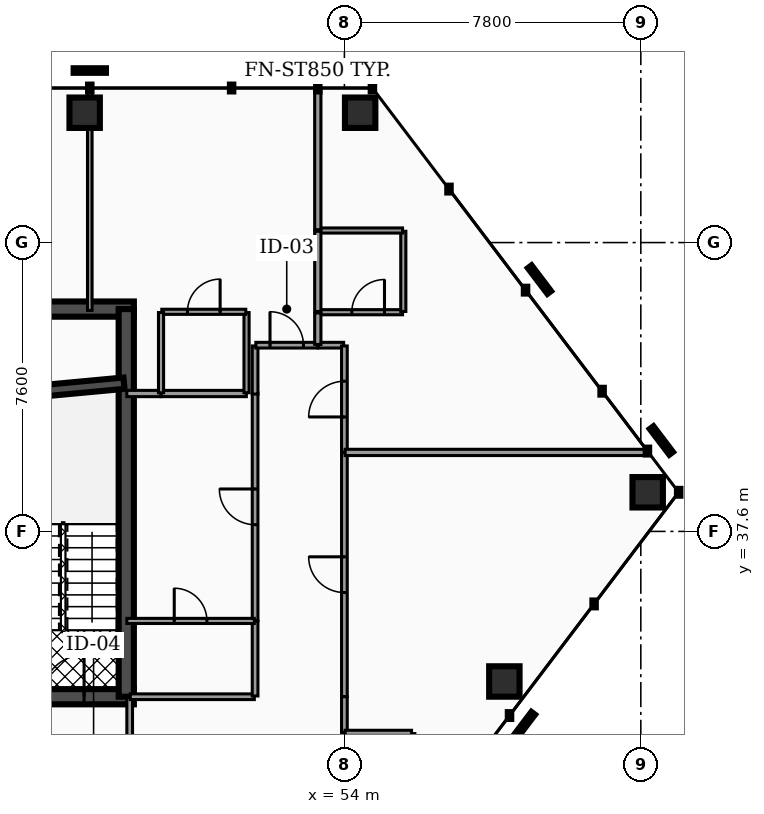
"""IFC4 building model, lengths in metres.
Left out: names, types, materials, properties, quantities, classifications, styles, units other than length and angle.
Written with IfcOpenShell. Run it as: python <this file> out.ifc"""

import sys

from ifc_helpers import new_model, si_unit, direction, frame, frame_2d, origin, origin_2d, place, context, subcontext, project, spatial, rectangle, hollow_rectangle, extrude, element, fill, save


model = new_model("IFC4")
c1 = context("Model", 3, precision=1e-05, world=origin(), true_north=direction((0.0, 1.0)))
c2 = subcontext(c1, "Body", "Model", "MODEL_VIEW")
j1 = project(units=[si_unit("LENGTHUNIT", "METRE"), si_unit("PLANEANGLEUNIT", "RADIAN")], contexts=[c1])
p1 = place(None, origin())
s1 = spatial("IfcSite", under=j1, at=p1, CompositionType="ELEMENT")
p2 = place(p1, origin())
s2 = spatial("IfcBuilding", under=s1, at=p2, CompositionType="ELEMENT")
p3 = place(p2, frame((0.0, 0.0, 123.42)))
s3 = spatial("IfcBuildingStorey", under=s2, at=p3, CompositionType="ELEMENT", Elevation=123.42)
p4 = place(p3, frame((28.4, 43.45, 0.0), z_axis=(0.0, 0.0, 1.0), x_axis=(1.0, 0.0, 0.0)))
e1 = element("IfcWall", 1, at=p4, inside=s3, PredefinedType="SHEAR", context=c2, shape_type="SweptSolid", body=[
    extrude(rectangle(XDim=20.06, YDim=0.4, at=frame_2d((10.03, 0.0))), origin(), (0.0, 0.0, 1.0), 3.5),
])
p5 = place(p3, frame((28.4, 33.25, 0.0), z_axis=(0.0, 0.0, 1.0), x_axis=(1.0, 0.0, 0.0)))
e2 = element("IfcWall", 2, at=p5, inside=s3, PredefinedType="SHEAR", context=c2, shape_type="SweptSolid", body=[
    extrude(rectangle(XDim=20.06, YDim=0.4, at=frame_2d((10.03, 0.0))), origin(), (0.0, 0.0, 1.0), 3.5),
])
p6 = place(p5, frame((4.03, 0.0, 0.0)))
e3 = element("IfcOpeningElement", 3, at=p6, cuts=e2, PredefinedType="OPENING", context=c2, shape_type="SweptSolid", body=[
    extrude(rectangle(XDim=1.1, YDim=2.15, at=frame_2d((0.55, 1.075))), frame((0.0, 0.21, 0.0), z_axis=(0.0, -1.0, 0.0), x_axis=(1.0, 0.0, 0.0)), (0.0, 0.0, 1.0), 0.42),
])
p7 = place(p5, frame((14.87, 0.0, 0.0)))
e4 = element("IfcOpeningElement", 4, at=p7, cuts=e2, PredefinedType="OPENING", context=c2, shape_type="SweptSolid", body=[
    extrude(rectangle(XDim=1.1, YDim=2.15, at=frame_2d((0.55, 1.075))), frame((0.0, 0.21, 0.0), z_axis=(0.0, -1.0, 0.0), x_axis=(1.0, 0.0, 0.0)), (0.0, 0.0, 1.0), 0.42),
])
p8 = place(p5, frame((5.95, 0.0, 0.0)))
e5 = element("IfcOpeningElement", 5, at=p8, cuts=e2, PredefinedType="OPENING", context=c2, shape_type="SweptSolid", body=[
    extrude(rectangle(XDim=1.0, YDim=2.1, at=frame_2d((0.5, 1.05))), frame((0.0, 0.21, 0.0), z_axis=(0.0, -1.0, 0.0), x_axis=(1.0, 0.0, 0.0)), (0.0, 0.0, 1.0), 0.42),
])
p9 = place(p5, frame((7.65, 0.0, 0.0)))
e6 = element("IfcOpeningElement", 6, at=p9, cuts=e2, PredefinedType="OPENING", context=c2, shape_type="SweptSolid", body=[
    extrude(rectangle(XDim=1.0, YDim=2.1, at=frame_2d((0.5, 1.05))), frame((0.0, 0.21, 0.0), z_axis=(0.0, -1.0, 0.0), x_axis=(1.0, 0.0, 0.0)), (0.0, 0.0, 1.0), 0.42),
])
p10 = place(p5, frame((1.31, 0.0, 0.0)))
e7 = element("IfcOpeningElement", 7, at=p10, cuts=e2, PredefinedType="OPENING", context=c2, shape_type="SweptSolid", body=[
    extrude(rectangle(XDim=1.1, YDim=2.2, at=frame_2d((0.55, 1.1))), frame((0.0, 0.21, 0.0), z_axis=(0.0, -1.0, 0.0), x_axis=(1.0, 0.0, 0.0)), (0.0, 0.0, 1.0), 0.42),
])
p11 = place(p5, frame((9.44, 0.0, 0.0)))
e8 = element("IfcOpeningElement", 8, at=p11, cuts=e2, PredefinedType="OPENING", context=c2, shape_type="SweptSolid", body=[
    extrude(rectangle(XDim=1.12, YDim=2.05, at=frame_2d((0.56, 1.025))), frame((0.0, 0.21, 0.0), z_axis=(0.0, -1.0, 0.0), x_axis=(1.0, 0.0, 0.0)), (0.0, 0.0, 1.0), 0.42),
])
p12 = place(p5, frame((17.65, 0.0, 0.0)))
e9 = element("IfcOpeningElement", 9, at=p12, cuts=e2, PredefinedType="OPENING", context=c2, shape_type="SweptSolid", body=[
    extrude(rectangle(XDim=1.1, YDim=2.2, at=frame_2d((0.55, 1.1))), frame((0.0, 0.21, 0.0), z_axis=(0.0, -1.0, 0.0), x_axis=(1.0, 0.0, 0.0)), (0.0, 0.0, 1.0), 0.42),
])
p13 = place(p3, frame((48.26, 33.25, 0.0), z_axis=(0.0, 0.0, 1.0), x_axis=(0.0, 1.0, 0.0)))
e10 = element("IfcWall", 10, at=p13, inside=s3, PredefinedType="SHEAR", context=c2, shape_type="SweptSolid", body=[
    extrude(rectangle(XDim=10.2, YDim=0.4, at=frame_2d((5.1, 0.0))), origin(), (0.0, 0.0, 1.0), 3.5),
])
p14 = place(p3, frame((44.98, 41.2, 0.0), z_axis=(0.0, 0.0, 1.0), x_axis=(0.995686468965, 0.09278176286, 0.0)))
e11 = element("IfcWall", 11, at=p14, inside=s3, PredefinedType="SHEAR", context=c2, shape_type="SweptSolid", body=[
    extrude(rectangle(XDim=3.234, YDim=0.3, at=frame_2d((1.617, 0.0))), origin(), (0.0, 0.0, 1.0), 3.5),
])
for number, where, z_axis, x_axis in (
    (12, (54.415, 48.617, 0.0), (0.0, 0.0, 1.0), (1.0, 0.0, 0.0)),
    (13, (47.165, 48.617, 0.0), (0.0, 0.0, 1.0), (1.0, 0.0, 0.0)),
    (14, (58.209, 33.651, 0.0), (0.0, 0.0, 1.0), (1.0, 0.0, 0.0)),
    (15, (61.981, 38.629, 0.0), (0.0, 0.0, 1.0), (1.0, 0.0, 0.0)),
):
    element("IfcColumn", number, at=place(p3, frame(where, z_axis=z_axis, x_axis=x_axis)), inside=s3, PredefinedType="COLUMN", context=c2, shape_type="SweptSolid", body=[
        extrude(hollow_rectangle(XDim=0.8, YDim=0.8, WallThickness=0.04, at=origin_2d()), origin(), (0.0, 0.0, 1.0), 3.5),
    ])
p15 = place(p3, frame((48.35, 30.17, 0.0), z_axis=(0.0, 0.0, 1.0), x_axis=(0.0, 1.0, 0.0)))
e16 = element("IfcWall", 16, at=p15, inside=s3, PredefinedType="PARTITIONING", context=c2, shape_type="SweptSolid", body=[
    extrude(rectangle(XDim=3.06, YDim=0.15, at=frame_2d((1.53, 0.0))), origin(), (0.0, 0.0, 1.0), 2.457),
])
p16 = place(p15, frame((1.06, 0.0, 0.0)))
e17 = element("IfcOpeningElement", 17, at=p16, cuts=e16, PredefinedType="OPENING", context=c2, shape_type="SweptSolid", body=[
    extrude(rectangle(XDim=0.94, YDim=2.05, at=frame_2d((0.47, 1.025))), frame((0.0, 0.085, 0.0), z_axis=(0.0, -1.0, 0.0), x_axis=(1.0, 0.0, 0.0)), (0.0, 0.0, 1.0), 0.17),
])
p17 = place(p3, frame((54.0, 33.25, 0.0), z_axis=(0.0, 0.0, 1.0), x_axis=(0.0, 1.0, 0.0)))
e18 = element("IfcWall", 18, at=p17, inside=s3, PredefinedType="PARTITIONING", context=c2, shape_type="SweptSolid", body=[
    extrude(rectangle(XDim=6.423, YDim=0.15, at=frame_2d((3.212, 0.0))), origin(), (0.0, 0.0, 1.0), 2.457),
])
p18 = place(p17, frame((2.742, 0.0, 0.0)))
e19 = element("IfcOpeningElement", 19, at=p18, cuts=e18, PredefinedType="OPENING", context=c2, shape_type="SweptSolid", body=[
    extrude(rectangle(XDim=0.94, YDim=2.05, at=frame_2d((0.47, 1.025))), frame((0.0, 0.085, 0.0), z_axis=(0.0, -1.0, 0.0), x_axis=(1.0, 0.0, 0.0)), (0.0, 0.0, 1.0), 0.17),
])
p19 = place(p3, frame((54.0, 32.305, 0.0), z_axis=(0.0, 0.0, 1.0), x_axis=(0.0, 1.0, 0.0)))
e20 = element("IfcWall", 20, at=p19, inside=s3, PredefinedType="PARTITIONING", context=c2, shape_type="SweptSolid", body=[
    extrude(rectangle(XDim=0.945, YDim=0.15, at=frame_2d((0.473, 0.0))), origin(), (0.0, 0.0, 1.0), 2.457),
])
p20 = place(p3, frame((54.0, 30.781, 0.0), z_axis=(0.0, 0.0, 1.0), x_axis=(0.0, 1.0, 0.0)))
e21 = element("IfcWall", 21, at=p20, inside=s3, PredefinedType="PARTITIONING", context=c2, shape_type="SweptSolid", body=[
    extrude(rectangle(XDim=1.514, YDim=0.15, at=frame_2d((0.757, 0.0))), origin(), (0.0, 0.0, 1.0), 2.457),
])
p21 = place(p3, frame((53.305, 42.5, 0.0), z_axis=(0.0, 0.0, 1.0), x_axis=(1.0, 0.0, 0.0)))
e22 = element("IfcWall", 22, at=p21, inside=s3, PredefinedType="PARTITIONING", context=c2, shape_type="SweptSolid", body=[
    extrude(rectangle(XDim=0.675, YDim=0.15, at=frame_2d((0.337, 0.0))), origin(), (0.0, 0.0, 1.0), 2.457),
])
p22 = place(p3, frame((54.0, 39.683, 0.0), z_axis=(0.0, 0.0, 1.0), x_axis=(0.0, 1.0, 0.0)))
e23 = element("IfcWall", 23, at=p22, inside=s3, PredefinedType="PARTITIONING", context=c2, shape_type="SweptSolid", body=[
    extrude(rectangle(XDim=2.797, YDim=0.15, at=frame_2d((1.398, 0.0))), origin(), (0.0, 0.0, 1.0), 2.457),
])
p23 = place(p22, frame((0.928, 0.0, 0.0)))
e24 = element("IfcOpeningElement", 24, at=p23, cuts=e23, PredefinedType="OPENING", context=c2, shape_type="SweptSolid", body=[
    extrude(rectangle(XDim=0.94, YDim=2.05, at=frame_2d((0.47, 1.025))), frame((0.0, 0.085, 0.0), z_axis=(0.0, -1.0, 0.0), x_axis=(1.0, 0.0, 0.0)), (0.0, 0.0, 1.0), 0.17),
])
p24 = place(p3, frame((51.65, 35.25, 0.0), z_axis=(0.0, 0.0, 1.0), x_axis=(0.0, 1.0, 0.0)))
e25 = element("IfcWall", 25, at=p24, inside=s3, PredefinedType="PARTITIONING", context=c2, shape_type="SweptSolid", body=[
    extrude(rectangle(XDim=5.994, YDim=0.15, at=frame_2d((2.997, 0.0))), origin(), (0.0, 0.0, 1.0), 2.457),
])
p25 = place(p24, frame((2.527, 0.0, 0.0)))
e26 = element("IfcOpeningElement", 26, at=p25, cuts=e25, PredefinedType="OPENING", context=c2, shape_type="SweptSolid", body=[
    extrude(rectangle(XDim=0.94, YDim=2.05, at=frame_2d((0.47, 1.025))), frame((0.0, 0.085, 0.0), z_axis=(0.0, -1.0, 0.0), x_axis=(1.0, 0.0, 0.0)), (0.0, 0.0, 1.0), 0.17),
])
p26 = place(p3, frame((48.365, 33.25, 0.0), z_axis=(0.0, 0.0, 1.0), x_axis=(1.0, 0.0, 0.0)))
e27 = element("IfcWall", 27, at=p26, inside=s3, PredefinedType="PARTITIONING", context=c2, shape_type="SweptSolid", body=[
    extrude(rectangle(XDim=3.265, YDim=0.15, at=frame_2d((1.632, 0.0))), origin(), (0.0, 0.0, 1.0), 2.457),
])
p27 = place(p3, frame((51.65, 33.27, 0.0), z_axis=(0.0, 0.0, 1.0), x_axis=(0.0, 1.0, 0.0)))
e28 = element("IfcWall", 28, at=p27, inside=s3, PredefinedType="PARTITIONING", context=c2, shape_type="SweptSolid", body=[
    extrude(rectangle(XDim=1.969, YDim=0.15, at=frame_2d((0.985, 0.0))), origin(), (0.0, 0.0, 1.0), 2.457),
])
p28 = place(p3, frame((51.65, 41.213, 0.0), z_axis=(0.0, 0.0, 1.0), x_axis=(0.0, 1.0, 0.0)))
e29 = element("IfcWall", 29, at=p28, inside=s3, PredefinedType="PARTITIONING", context=c2, shape_type="SweptSolid", body=[
    extrude(rectangle(XDim=1.267, YDim=0.15, at=frame_2d((0.633, 0.0))), origin(), (0.0, 0.0, 1.0), 2.457),
])
p29 = place(p3, frame((51.67, 42.5, 0.0), z_axis=(0.0, 0.0, 1.0), x_axis=(1.0, 0.0, 0.0)))
e30 = element("IfcWall", 30, at=p29, inside=s3, PredefinedType="PARTITIONING", context=c2, shape_type="SweptSolid", body=[
    extrude(rectangle(XDim=1.625, YDim=0.15, at=frame_2d((0.812, 0.0))), origin(), (0.0, 0.0, 1.0), 2.457),
])
p30 = place(p29, frame((0.373, 0.0, 0.0)))
e31 = element("IfcOpeningElement", 31, at=p30, cuts=e30, PredefinedType="OPENING", context=c2, shape_type="SweptSolid", body=[
    extrude(rectangle(XDim=0.88, YDim=2.05, at=frame_2d((0.44, 1.025))), frame((0.0, 0.085, 0.0), z_axis=(0.0, -1.0, 0.0), x_axis=(1.0, 0.0, 0.0)), (0.0, 0.0, 1.0), 0.17),
])
p31 = place(p3, frame((47.3, 43.415, 0.0), z_axis=(0.0, 0.0, 1.0), x_axis=(0.0, 1.0, 0.0)))
e32 = element("IfcWall", 32, at=p31, inside=s3, PredefinedType="PARTITIONING", context=c2, shape_type="SweptSolid", body=[
    extrude(rectangle(XDim=5.837, YDim=0.12, at=frame_2d((2.918, 0.0))), origin(), (0.0, 0.0, 1.0), 2.457),
])
p32 = place(p3, frame((55.787, 30.17, 0.0), z_axis=(0.0, 0.0, 1.0), x_axis=(0.0, 1.0, 0.0)))
e33 = element("IfcWall", 33, at=p32, inside=s3, PredefinedType="PARTITIONING", context=c2, shape_type="SweptSolid", body=[
    extrude(rectangle(XDim=2.11, YDim=0.135, at=frame_2d((1.055, 0.0))), origin(), (0.0, 0.0, 1.0), 2.457),
])
p33 = place(p32, frame((0.625, 0.0, 0.0)))
e34 = element("IfcOpeningElement", 34, at=p33, cuts=e33, PredefinedType="OPENING", context=c2, shape_type="SweptSolid", body=[
    extrude(rectangle(XDim=0.86, YDim=2.05, at=frame_2d((0.43, 1.025))), frame((0.0, 0.077, 0.0), z_axis=(0.0, -1.0, 0.0), x_axis=(1.0, 0.0, 0.0)), (0.0, 0.0, 1.0), 0.155),
])
p34 = place(p3, frame((54.02, 32.3, 0.0), z_axis=(0.0, 0.0, 1.0), x_axis=(1.0, 0.0, 0.0)))
e35 = element("IfcWall", 35, at=p34, inside=s3, PredefinedType="PARTITIONING", context=c2, shape_type="SweptSolid", body=[
    extrude(rectangle(XDim=1.747, YDim=0.135, at=frame_2d((0.874, 0.0))), origin(), (0.0, 0.0, 1.0), 2.457),
])
p35 = place(p3, frame((54.02, 39.678, 0.0), z_axis=(0.0, 0.0, 1.0), x_axis=(1.0, 0.0, 0.0)))
e36 = element("IfcWall", 36, at=p35, inside=s3, PredefinedType="PARTITIONING", context=c2, shape_type="SweptSolid", body=[
    extrude(rectangle(XDim=7.967, YDim=0.165, at=frame_2d((3.983, 0.0))), origin(), (0.0, 0.0, 1.0), 2.457),
])
p36 = place(p3, frame((53.32, 43.367, 0.0), z_axis=(0.0, 0.0, 1.0), x_axis=(1.0, 0.0, 0.0)))
e37 = element("IfcWall", 37, at=p36, inside=s3, PredefinedType="PARTITIONING", context=c2, shape_type="SweptSolid", body=[
    extrude(rectangle(XDim=2.21, YDim=0.135, at=frame_2d((1.105, 0.0))), origin(), (0.0, 0.0, 1.0), 2.457),
])
p37 = place(p36, frame((0.875, 0.0, 0.0)))
e38 = element("IfcOpeningElement", 38, at=p37, cuts=e37, PredefinedType="OPENING", context=c2, shape_type="SweptSolid", body=[
    extrude(rectangle(XDim=0.86, YDim=2.05, at=frame_2d((0.43, 1.025))), frame((0.0, 0.077, 0.0), z_axis=(0.0, -1.0, 0.0), x_axis=(1.0, 0.0, 0.0)), (0.0, 0.0, 1.0), 0.155),
])
p38 = place(p3, frame((55.55, 43.387, 0.0), z_axis=(0.0, 0.0, 1.0), x_axis=(0.0, 1.0, 0.0)))
e39 = element("IfcWall", 39, at=p38, inside=s3, PredefinedType="PARTITIONING", context=c2, shape_type="SweptSolid", body=[
    extrude(rectangle(XDim=2.11, YDim=0.135, at=frame_2d((1.055, 0.0))), origin(), (0.0, 0.0, 1.0), 2.457),
])
p39 = place(p3, frame((53.32, 45.518, 0.0), z_axis=(0.0, 0.0, 1.0), x_axis=(1.0, 0.0, 0.0)))
e40 = element("IfcWall", 40, at=p39, inside=s3, PredefinedType="PARTITIONING", context=c2, shape_type="SweptSolid", body=[
    extrude(rectangle(XDim=2.21, YDim=0.135, at=frame_2d((1.105, 0.0))), origin(), (0.0, 0.0, 1.0), 2.457),
])
p40 = place(p3, frame((53.3, 42.52, 0.0), z_axis=(0.0, 0.0, 1.0), x_axis=(0.0, 1.0, 0.0)))
e41 = element("IfcWall", 41, at=p40, inside=s3, PredefinedType="PARTITIONING", context=c2, shape_type="SweptSolid", body=[
    extrude(rectangle(XDim=0.827, YDim=0.165, at=frame_2d((0.414, 0.0))), origin(), (0.0, 0.0, 1.0), 2.457),
])
p41 = place(p3, frame((53.3, 45.538, 0.0), z_axis=(0.0, 0.0, 1.0), x_axis=(0.0, 1.0, 0.0)))
e42 = element("IfcWall", 42, at=p41, inside=s3, PredefinedType="PARTITIONING", context=c2, shape_type="SweptSolid", body=[
    extrude(rectangle(XDim=3.714, YDim=0.165, at=frame_2d((1.857, 0.0))), origin(), (0.0, 0.0, 1.0), 2.457),
])
p42 = place(p3, frame((53.3, 43.387, 0.0), z_axis=(0.0, 0.0, 1.0), x_axis=(0.0, 1.0, 0.0)))
e43 = element("IfcWall", 43, at=p42, inside=s3, PredefinedType="PARTITIONING", context=c2, shape_type="SweptSolid", body=[
    extrude(rectangle(XDim=2.11, YDim=0.165, at=frame_2d((1.055, 0.0))), origin(), (0.0, 0.0, 1.0), 2.457),
])
p43 = place(p3, frame((48.275, 35.245, 0.0), z_axis=(0.0, 0.0, 1.0), x_axis=(1.0, 0.0, 0.0)))
e44 = element("IfcWall", 44, at=p43, inside=s3, PredefinedType="PARTITIONING", context=c2, shape_type="SweptSolid", body=[
    extrude(rectangle(XDim=3.355, YDim=0.135, at=frame_2d((1.677, 0.0))), origin(), (0.0, 0.0, 1.0), 2.457),
])
p44 = place(p43, frame((1.248, 0.0, 0.0)))
e45 = element("IfcOpeningElement", 45, at=p44, cuts=e44, PredefinedType="OPENING", context=c2, shape_type="SweptSolid", body=[
    extrude(rectangle(XDim=0.86, YDim=2.05, at=frame_2d((0.43, 1.025))), frame((0.0, 0.077, 0.0), z_axis=(0.0, -1.0, 0.0), x_axis=(1.0, 0.0, 0.0)), (0.0, 0.0, 1.0), 0.155),
])
p45 = place(p3, frame((48.275, 41.228, 0.0), z_axis=(0.0, 0.0, 1.0), x_axis=(1.0, 0.0, 0.0)))
e46 = element("IfcWall", 46, at=p45, inside=s3, PredefinedType="PARTITIONING", context=c2, shape_type="SweptSolid", body=[
    extrude(rectangle(XDim=0.895, YDim=0.165, at=frame_2d((0.448, 0.0))), origin(), (0.0, 0.0, 1.0), 2.457),
])
p46 = place(p3, frame((49.18, 41.228, 0.0), z_axis=(0.0, 0.0, 1.0), x_axis=(1.0, 0.0, 0.0)))
e47 = element("IfcWall", 47, at=p46, inside=s3, PredefinedType="PARTITIONING", context=c2, shape_type="SweptSolid", body=[
    extrude(rectangle(XDim=2.24, YDim=0.165, at=frame_2d((1.12, 0.0))), origin(), (0.0, 0.0, 1.0), 2.457),
])
p47 = place(p3, frame((51.425, 41.248, 0.0), z_axis=(0.0, 0.0, 1.0), x_axis=(0.0, 1.0, 0.0)))
e48 = element("IfcWall", 48, at=p47, inside=s3, PredefinedType="PARTITIONING", context=c2, shape_type="SweptSolid", body=[
    extrude(rectangle(XDim=2.11, YDim=0.135, at=frame_2d((1.055, 0.0))), origin(), (0.0, 0.0, 1.0), 2.457),
])
p48 = place(p3, frame((49.195, 43.378, 0.0), z_axis=(0.0, 0.0, 1.0), x_axis=(1.0, 0.0, 0.0)))
e49 = element("IfcWall", 49, at=p48, inside=s3, PredefinedType="PARTITIONING", context=c2, shape_type="SweptSolid", body=[
    extrude(rectangle(XDim=2.21, YDim=0.135, at=frame_2d((1.105, 0.0))), origin(), (0.0, 0.0, 1.0), 2.457),
])
p49 = place(p48, frame((0.675, 0.0, 0.0)))
e50 = element("IfcOpeningElement", 50, at=p49, cuts=e49, PredefinedType="OPENING", context=c2, shape_type="SweptSolid", body=[
    extrude(rectangle(XDim=0.86, YDim=2.05, at=frame_2d((0.43, 1.025))), frame((0.0, 0.077, 0.0), z_axis=(0.0, -1.0, 0.0), x_axis=(1.0, 0.0, 0.0)), (0.0, 0.0, 1.0), 0.155),
])
p50 = place(p3, frame((49.175, 41.248, 0.0), z_axis=(0.0, 0.0, 1.0), x_axis=(0.0, 1.0, 0.0)))
e51 = element("IfcWall", 51, at=p50, inside=s3, PredefinedType="PARTITIONING", context=c2, shape_type="SweptSolid", body=[
    extrude(rectangle(XDim=2.11, YDim=0.135, at=frame_2d((1.055, 0.0))), origin(), (0.0, 0.0, 1.0), 2.457),
])
p51 = place(p12, origin())
e52 = element("IfcDoor", 52, at=p51, inside=s3, OperationType="SINGLE_SWING_RIGHT", PredefinedType="DOOR", context=c2, shape_type="SweptSolid", body=[
    extrude(rectangle(XDim=1.1, YDim=2.2, at=frame_2d((0.55, 1.1))), frame((0.0, 0.025, 0.0), z_axis=(0.0, -1.0, 0.0), x_axis=(1.0, 0.0, 0.0)), (0.0, 0.0, 1.0), 0.05),
])
fill(e9, e52)
p52 = place(p18, origin())
e53 = element("IfcDoor", 53, at=p52, inside=s3, OperationType="SINGLE_SWING_RIGHT", PredefinedType="DOOR", context=c2, shape_type="SweptSolid", body=[
    extrude(rectangle(XDim=0.94, YDim=2.05, at=frame_2d((0.47, 1.025))), frame((0.0, 0.025, 0.0), z_axis=(0.0, -1.0, 0.0), x_axis=(1.0, 0.0, 0.0)), (0.0, 0.0, 1.0), 0.05),
])
fill(e19, e53)
p53 = place(p23, origin())
e54 = element("IfcDoor", 54, at=p53, inside=s3, OperationType="SINGLE_SWING_LEFT", PredefinedType="DOOR", context=c2, shape_type="SweptSolid", body=[
    extrude(rectangle(XDim=0.94, YDim=2.05, at=frame_2d((0.47, 1.025))), frame((0.0, 0.025, 0.0), z_axis=(0.0, -1.0, 0.0), x_axis=(1.0, 0.0, 0.0)), (0.0, 0.0, 1.0), 0.05),
])
fill(e24, e54)
p54 = place(p25, origin())
e55 = element("IfcDoor", 55, at=p54, inside=s3, OperationType="SINGLE_SWING_RIGHT", PredefinedType="DOOR", context=c2, shape_type="SweptSolid", body=[
    extrude(rectangle(XDim=0.94, YDim=2.05, at=frame_2d((0.47, 1.025))), frame((0.0, 0.025, 0.0), z_axis=(0.0, -1.0, 0.0), x_axis=(1.0, 0.0, 0.0)), (0.0, 0.0, 1.0), 0.05),
])
fill(e26, e55)
p55 = place(p30, origin())
e56 = element("IfcDoor", 56, at=p55, inside=s3, OperationType="SINGLE_SWING_LEFT", PredefinedType="DOOR", context=c2, shape_type="SweptSolid", body=[
    extrude(rectangle(XDim=0.88, YDim=2.05, at=frame_2d((0.44, 1.025))), frame((0.0, 0.025, 0.0), z_axis=(0.0, -1.0, 0.0), x_axis=(1.0, 0.0, 0.0)), (0.0, 0.0, 1.0), 0.05),
])
fill(e31, e56)
p56 = place(p37, origin())
e57 = element("IfcDoor", 57, at=p56, inside=s3, OperationType="SINGLE_SWING_RIGHT", PredefinedType="DOOR", context=c2, shape_type="SweptSolid", body=[
    extrude(rectangle(XDim=0.86, YDim=2.05, at=frame_2d((0.43, 1.025))), frame((0.0, 0.025, 0.0), z_axis=(0.0, -1.0, 0.0), x_axis=(1.0, 0.0, 0.0)), (0.0, 0.0, 1.0), 0.05),
])
fill(e38, e57)
p57 = place(p44, origin())
e58 = element("IfcDoor", 58, at=p57, inside=s3, OperationType="SINGLE_SWING_LEFT", PredefinedType="DOOR", context=c2, shape_type="SweptSolid", body=[
    extrude(rectangle(XDim=0.86, YDim=2.05, at=frame_2d((0.43, 1.025))), frame((0.0, 0.025, 0.0), z_axis=(0.0, -1.0, 0.0), x_axis=(1.0, 0.0, 0.0)), (0.0, 0.0, 1.0), 0.05),
])
fill(e45, e58)
p58 = place(p49, origin())
e59 = element("IfcDoor", 59, at=p58, inside=s3, OperationType="SINGLE_SWING_RIGHT", PredefinedType="DOOR", context=c2, shape_type="SweptSolid", body=[
    extrude(rectangle(XDim=0.86, YDim=2.05, at=frame_2d((0.43, 1.025))), frame((0.0, 0.025, 0.0), z_axis=(0.0, -1.0, 0.0), x_axis=(1.0, 0.0, 0.0)), (0.0, 0.0, 1.0), 0.05),
])
fill(e50, e59)
save(model, sys.argv[1])
